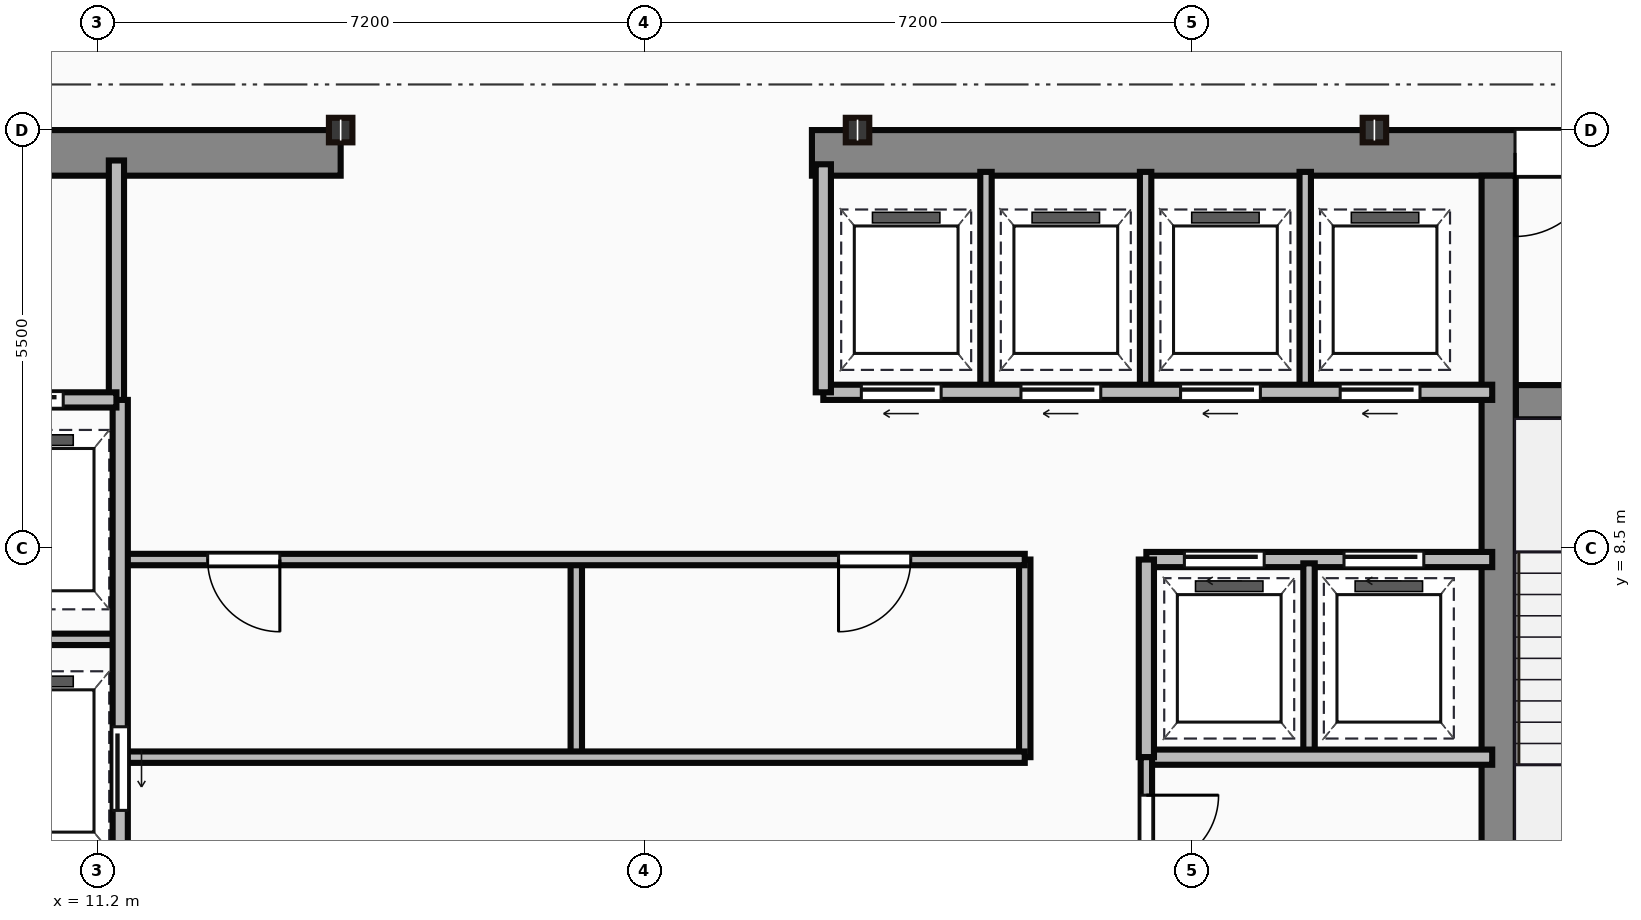
"""IFC4 building model, lengths in metres.
Left out: names, types, materials, properties, quantities, classifications, styles, units other than length and angle.
Written with IfcOpenShell. Run it as: python <this file> out.ifc"""

import sys

from ifc_helpers import new_model, si_unit, direction, frame, frame_2d, origin, origin_2d, place, context, subcontext, project, spatial, rectangle, i_section, extrude, source, transform, mapped, element, fill, save


model = new_model("IFC4")
c1 = context("Model", 3, precision=1e-05, world=origin(), true_north=direction((0.0, 1.0)))
c2 = subcontext(c1, "Body", "Model", "MODEL_VIEW")
j1 = project(units=[si_unit("LENGTHUNIT", "METRE"), si_unit("PLANEANGLEUNIT", "RADIAN")], contexts=[c1])
p1 = place(None, origin())
s1 = spatial("IfcSite", under=j1, at=p1, CompositionType="ELEMENT")
p2 = place(p1, origin())
s2 = spatial("IfcBuilding", under=s1, at=p2, CompositionType="ELEMENT")
p3 = place(p2, frame((0.0, 0.0, 232.4)))
s3 = spatial("IfcBuildingStorey", under=s2, at=p3, CompositionType="ELEMENT", Elevation=232.4)
m1 = source(origin(), c2, "Body", "SweptSolid", [
    extrude(rectangle(XDim=9.1, YDim=0.6, at=frame_2d((4.55, 0.0))), origin(), (0.0, 0.0, 1.0), 3.65),
])
p4 = place(p3, frame((5.3, 13.7, 0.0), z_axis=(0.0, 0.0, 1.0), x_axis=(1.0, 0.0, 0.0)))
e1 = element("IfcWall", 1, at=p4, inside=s3, PredefinedType="SHEAR", context=c2, shape_type="MappedRepresentation", body=[
    mapped(m1, transform((0.0, 0.0, 0.0))),
])
p5 = place(p4, frame((4.1, 0.0, 0.0)))
e2 = element("IfcOpeningElement", 2, at=p5, cuts=e1, PredefinedType="OPENING", context=c2, shape_type="SweptSolid", body=[
    extrude(rectangle(XDim=1.1, YDim=2.15, at=frame_2d((0.55, 1.075))), frame((0.0, 0.31, 0.0), z_axis=(0.0, -1.0, 0.0), x_axis=(1.0, 0.0, 0.0)), (0.0, 0.0, 1.0), 0.62),
])
m2 = source(origin(), c2, "Body", "SweptSolid", [
    extrude(rectangle(XDim=12.6, YDim=0.6, at=frame_2d((6.3, 0.0))), origin(), (0.0, 0.0, 1.0), 3.65),
])
p6 = place(p3, frame((20.6, 13.7, 0.0), z_axis=(0.0, 0.0, 1.0), x_axis=(1.0, 0.0, 0.0)))
e3 = element("IfcWall", 3, at=p6, inside=s3, PredefinedType="SHEAR", context=c2, shape_type="MappedRepresentation", body=[
    mapped(m2, transform((0.0, 0.0, 0.0))),
])
p7 = place(p6, frame((9.25, 0.0, 0.0)))
e4 = element("IfcOpeningElement", 4, at=p7, cuts=e3, PredefinedType="OPENING", context=c2, shape_type="SweptSolid", body=[
    extrude(rectangle(XDim=1.1, YDim=2.15, at=frame_2d((0.55, 1.075))), frame((0.0, 0.31, 0.0), z_axis=(0.0, -1.0, 0.0), x_axis=(1.0, 0.0, 0.0)), (0.0, 0.0, 1.0), 0.62),
])
m3 = source(origin(), c2, "Body", "SweptSolid", [
    extrude(rectangle(XDim=12.5, YDim=0.45, at=frame_2d((6.25, 0.0))), origin(), (0.0, 0.0, 1.0), 3.65),
])
p8 = place(p3, frame((29.635, 0.9, 0.0), z_axis=(0.0, 0.0, 1.0), x_axis=(0.0, 1.0, 0.0)))
e5 = element("IfcWall", 5, at=p8, inside=s3, PredefinedType="SHEAR", context=c2, shape_type="MappedRepresentation", body=[
    mapped(m3, transform((0.0, 0.0, 0.0))),
])
m4 = source(origin(), c2, "Body", "SweptSolid", [
    extrude(rectangle(XDim=3.39, YDim=0.45, at=frame_2d((1.695, 0.0))), origin(), (0.0, 0.0, 1.0), 3.65),
])
p9 = place(p3, frame((29.86, 10.42, 0.0), z_axis=(0.0, 0.0, 1.0), x_axis=(1.0, 0.0, 0.0)))
e6 = element("IfcWall", 6, at=p9, inside=s3, PredefinedType="SHEAR", context=c2, shape_type="MappedRepresentation", body=[
    mapped(m4, transform((0.0, 0.0, 0.0))),
])
p10 = place(p9, frame((1.1, 0.0, 0.0)))
e7 = element("IfcOpeningElement", 7, at=p10, cuts=e6, PredefinedType="OPENING", context=c2, shape_type="SweptSolid", body=[
    extrude(rectangle(XDim=1.1, YDim=2.15, at=frame_2d((0.55, 1.075))), frame((0.0, 0.235, 0.0), z_axis=(0.0, -1.0, 0.0), x_axis=(1.0, 0.0, 0.0)), (0.0, 0.0, 1.0), 0.47),
])
m5 = source(origin(), c2, "Body", "SweptSolid", [
    extrude(i_section(OverallWidth=0.309, OverallDepth=0.323, WebThickness=0.014, FlangeThickness=0.023, at=origin_2d()), origin(), (0.0, 0.0, 1.0), 3.65),
])
for number, where, z_axis, x_axis in (
    (8, (14.4, 14.0, 0.0), (0.0, 0.0, 1.0), (1.0, 0.0, 0.0)),
    (9, (21.2, 14.0, 0.0), (0.0, 0.0, 1.0), (1.0, 0.0, 0.0)),
    (10, (28.0, 14.0, 0.0), (0.0, 0.0, 1.0), (1.0, 0.0, 0.0)),
):
    element("IfcColumn", number, at=place(p3, frame(where, z_axis=z_axis, x_axis=x_axis)), inside=s3, PredefinedType="COLUMN", context=c2, shape_type="MappedRepresentation", body=[
        mapped(m5, transform((0.0, 0.0, 0.0))),
    ])
m6 = source(origin(), c2, "Body", "SweptSolid", [
    extrude(rectangle(XDim=3.18, YDim=0.2, at=frame_2d((1.59, 0.0))), origin(), (0.0, 0.0, 1.0), 3.35),
])
p11 = place(p3, frame((11.45, 10.42, 0.0), z_axis=(0.0, 0.0, 1.0), x_axis=(0.0, 1.0, 0.0)))
e11 = element("IfcWall", 11, at=p11, inside=s3, PredefinedType="PARTITIONING", context=c2, shape_type="MappedRepresentation", body=[
    mapped(m6, transform((0.0, 0.0, 0.0))),
])
m7 = source(origin(), c2, "Body", "SweptSolid", [
    extrude(rectangle(XDim=2.35, YDim=0.2, at=frame_2d((1.175, 0.0))), origin(), (0.0, 0.0, 1.0), 3.35),
])
p12 = place(p3, frame((9.1, 10.45, 0.0), z_axis=(0.0, 0.0, 1.0), x_axis=(1.0, 0.0, 0.0)))
e12 = element("IfcWall", 12, at=p12, inside=s3, PredefinedType="PARTITIONING", context=c2, shape_type="MappedRepresentation", body=[
    mapped(m7, transform((0.0, 0.0, 0.0))),
])
p13 = place(p12, frame((0.55, 0.0, 0.0)))
e13 = element("IfcOpeningElement", 13, at=p13, cuts=e12, PredefinedType="OPENING", context=c2, shape_type="SweptSolid", body=[
    extrude(rectangle(XDim=1.1, YDim=2.15, at=frame_2d((0.55, 1.075))), frame((0.0, 0.11, 0.0), z_axis=(0.0, -1.0, 0.0), x_axis=(1.0, 0.0, 0.0)), (0.0, 0.0, 1.0), 0.22),
])
m8 = source(origin(), c2, "Body", "SweptSolid", [
    extrude(rectangle(XDim=9.6, YDim=0.2, at=frame_2d((4.8, 0.0))), origin(), (0.0, 0.0, 1.0), 3.35),
])
p14 = place(p3, frame((11.5, 0.85, 0.0), z_axis=(0.0, 0.0, 1.0), x_axis=(0.0, 1.0, 0.0)))
e14 = element("IfcWall", 14, at=p14, inside=s3, PredefinedType="PARTITIONING", context=c2, shape_type="MappedRepresentation", body=[
    mapped(m8, transform((0.0, 0.0, 0.0))),
])
p15 = place(p14, frame((4.2, 0.0, 0.0)))
e15 = element("IfcOpeningElement", 15, at=p15, cuts=e14, PredefinedType="OPENING", context=c2, shape_type="SweptSolid", body=[
    extrude(rectangle(XDim=1.1, YDim=2.15, at=frame_2d((0.55, 1.075))), frame((0.0, 0.11, 0.0), z_axis=(0.0, -1.0, 0.0), x_axis=(1.0, 0.0, 0.0)), (0.0, 0.0, 1.0), 0.22),
])
p16 = place(p14, frame((0.9, 0.0, 0.0)))
e16 = element("IfcOpeningElement", 16, at=p16, cuts=e14, PredefinedType="OPENING", context=c2, shape_type="SweptSolid", body=[
    extrude(rectangle(XDim=1.2, YDim=2.15, at=frame_2d((0.6, 1.075))), frame((0.0, 0.11, 0.0), z_axis=(0.0, -1.0, 0.0), x_axis=(1.0, 0.0, 0.0)), (0.0, 0.0, 1.0), 0.22),
])
m9 = source(origin(), c2, "Body", "SweptSolid", [
    extrude(rectangle(XDim=2.4, YDim=0.15, at=frame_2d((1.2, 0.0))), origin(), (0.0, 0.0, 1.0), 3.35),
])
p17 = place(p3, frame((9.1, 7.3, 0.0), z_axis=(0.0, 0.0, 1.0), x_axis=(1.0, 0.0, 0.0)))
e17 = element("IfcWall", 17, at=p17, inside=s3, PredefinedType="PARTITIONING", context=c2, shape_type="MappedRepresentation", body=[
    mapped(m9, transform((0.0, 0.0, 0.0))),
])
m10 = source(origin(), c2, "Body", "SweptSolid", [
    extrude(rectangle(XDim=11.85, YDim=0.15, at=frame_2d((5.925, 0.0))), origin(), (0.0, 0.0, 1.0), 3.35),
])
p18 = place(p3, frame((11.55, 5.75, 0.0), z_axis=(0.0, 0.0, 1.0), x_axis=(1.0, 0.0, 0.0)))
e18 = element("IfcWall", 18, at=p18, inside=s3, PredefinedType="PARTITIONING", context=c2, shape_type="MappedRepresentation", body=[
    mapped(m10, transform((0.0, 0.0, 0.0))),
])
p19 = place(p3, frame((11.55, 8.35, 0.0), z_axis=(0.0, 0.0, 1.0), x_axis=(1.0, 0.0, 0.0)))
e19 = element("IfcWall", 19, at=p19, inside=s3, PredefinedType="PARTITIONING", context=c2, shape_type="MappedRepresentation", body=[
    mapped(m10, transform((0.0, 0.0, 0.0))),
])
p20 = place(p19, frame((1.1, 0.0, 0.0)))
e20 = element("IfcOpeningElement", 20, at=p20, cuts=e19, PredefinedType="OPENING", context=c2, shape_type="SweptSolid", body=[
    extrude(rectangle(XDim=0.95, YDim=2.15, at=frame_2d((0.475, 1.075))), frame((0.0, 0.085, 0.0), z_axis=(0.0, -1.0, 0.0), x_axis=(1.0, 0.0, 0.0)), (0.0, 0.0, 1.0), 0.17),
])
p21 = place(p19, frame((9.4, 0.0, 0.0)))
e21 = element("IfcOpeningElement", 21, at=p21, cuts=e19, PredefinedType="OPENING", context=c2, shape_type="SweptSolid", body=[
    extrude(rectangle(XDim=0.95, YDim=2.15, at=frame_2d((0.475, 1.075))), frame((0.0, 0.085, 0.0), z_axis=(0.0, -1.0, 0.0), x_axis=(1.0, 0.0, 0.0)), (0.0, 0.0, 1.0), 0.17),
])
m11 = source(origin(), c2, "Body", "SweptSolid", [
    extrude(rectangle(XDim=2.6, YDim=0.15, at=frame_2d((1.3, 0.0))), origin(), (0.0, 0.0, 1.0), 3.35),
])
p22 = place(p3, frame((23.4, 5.75, 0.0), z_axis=(0.0, 0.0, 1.0), x_axis=(0.0, 1.0, 0.0)))
e22 = element("IfcWall", 22, at=p22, inside=s3, PredefinedType="PARTITIONING", context=c2, shape_type="MappedRepresentation", body=[
    mapped(m11, transform((0.0, 0.0, 0.0))),
])
m12 = source(origin(), c2, "Body", "SweptSolid", [
    extrude(rectangle(XDim=2.5, YDim=0.15, at=frame_2d((1.25, 0.0))), origin(), (0.0, 0.0, 1.0), 3.35),
])
p23 = place(p3, frame((17.5, 5.8, 0.0), z_axis=(0.0, 0.0, 1.0), x_axis=(0.0, 1.0, 0.0)))
e23 = element("IfcWall", 23, at=p23, inside=s3, PredefinedType="PARTITIONING", context=c2, shape_type="MappedRepresentation", body=[
    mapped(m12, transform((0.0, 0.0, 0.0))),
])
m13 = source(origin(), c2, "Body", "SweptSolid", [
    extrude(rectangle(XDim=8.8, YDim=0.2, at=frame_2d((4.4, 0.0))), origin(), (0.0, 0.0, 1.0), 3.35),
])
p24 = place(p3, frame((20.75, 10.55, 0.0), z_axis=(0.0, 0.0, 1.0), x_axis=(1.0, 0.0, 0.0)))
e24 = element("IfcWall", 24, at=p24, inside=s3, PredefinedType="PARTITIONING", context=c2, shape_type="MappedRepresentation", body=[
    mapped(m13, transform((0.0, 0.0, 0.0))),
])
p25 = place(p24, frame((0.5, 0.0, 0.0)))
e25 = element("IfcOpeningElement", 25, at=p25, cuts=e24, PredefinedType="OPENING", context=c2, shape_type="SweptSolid", body=[
    extrude(rectangle(XDim=1.05, YDim=2.15, at=frame_2d((0.525, 1.075))), frame((0.0, 0.11, 0.0), z_axis=(0.0, -1.0, 0.0), x_axis=(1.0, 0.0, 0.0)), (0.0, 0.0, 1.0), 0.22),
])
p26 = place(p24, frame((2.6, 0.0, 0.0)))
e26 = element("IfcOpeningElement", 26, at=p26, cuts=e24, PredefinedType="OPENING", context=c2, shape_type="SweptSolid", body=[
    extrude(rectangle(XDim=1.05, YDim=2.15, at=frame_2d((0.525, 1.075))), frame((0.0, 0.11, 0.0), z_axis=(0.0, -1.0, 0.0), x_axis=(1.0, 0.0, 0.0)), (0.0, 0.0, 1.0), 0.22),
])
p27 = place(p24, frame((4.7, 0.0, 0.0)))
e27 = element("IfcOpeningElement", 27, at=p27, cuts=e24, PredefinedType="OPENING", context=c2, shape_type="SweptSolid", body=[
    extrude(rectangle(XDim=1.05, YDim=2.15, at=frame_2d((0.525, 1.075))), frame((0.0, 0.11, 0.0), z_axis=(0.0, -1.0, 0.0), x_axis=(1.0, 0.0, 0.0)), (0.0, 0.0, 1.0), 0.22),
])
p28 = place(p24, frame((6.8, 0.0, 0.0)))
e28 = element("IfcOpeningElement", 28, at=p28, cuts=e24, PredefinedType="OPENING", context=c2, shape_type="SweptSolid", body=[
    extrude(rectangle(XDim=1.05, YDim=2.15, at=frame_2d((0.525, 1.075))), frame((0.0, 0.11, 0.0), z_axis=(0.0, -1.0, 0.0), x_axis=(1.0, 0.0, 0.0)), (0.0, 0.0, 1.0), 0.22),
])
m14 = source(origin(), c2, "Body", "SweptSolid", [
    extrude(rectangle(XDim=3.0, YDim=0.2, at=frame_2d((1.5, 0.0))), origin(), (0.0, 0.0, 1.0), 3.35),
])
p29 = place(p3, frame((20.75, 10.55, 0.0), z_axis=(0.0, 0.0, 1.0), x_axis=(0.0, 1.0, 0.0)))
e29 = element("IfcWall", 29, at=p29, inside=s3, PredefinedType="PARTITIONING", context=c2, shape_type="MappedRepresentation", body=[
    mapped(m14, transform((0.0, 0.0, 0.0))),
])
m15 = source(origin(), c2, "Body", "SweptSolid", [
    extrude(rectangle(XDim=2.85, YDim=0.15, at=frame_2d((1.425, 0.0))), origin(), (0.0, 0.0, 1.0), 3.35),
])
for number, where, z_axis, x_axis in (
    (30, (22.89, 10.6, 0.0), (0.0, 0.0, 1.0), (0.0, 1.0, 0.0)),
    (31, (24.99, 10.6, 0.0), (0.0, 0.0, 1.0), (0.0, 1.0, 0.0)),
    (32, (27.09, 10.6, 0.0), (0.0, 0.0, 1.0), (0.0, 1.0, 0.0)),
):
    element("IfcWall", number, at=place(p3, frame(where, z_axis=z_axis, x_axis=x_axis)), inside=s3, PredefinedType="PARTITIONING", context=c2, shape_type="MappedRepresentation", body=[
        mapped(m15, transform((0.0, 0.0, 0.0))),
    ])
m16 = source(origin(), c2, "Body", "SweptSolid", [
    extrude(rectangle(XDim=4.55, YDim=0.2, at=frame_2d((2.275, 0.0))), origin(), (0.0, 0.0, 1.0), 3.35),
])
p30 = place(p3, frame((25.0, 8.35, 0.0), z_axis=(0.0, 0.0, 1.0), x_axis=(1.0, 0.0, 0.0)))
e33 = element("IfcWall", 33, at=p30, inside=s3, PredefinedType="PARTITIONING", context=c2, shape_type="MappedRepresentation", body=[
    mapped(m16, transform((0.0, 0.0, 0.0))),
])
p31 = place(p30, frame((0.5, 0.0, 0.0)))
e34 = element("IfcOpeningElement", 34, at=p31, cuts=e33, PredefinedType="OPENING", context=c2, shape_type="SweptSolid", body=[
    extrude(rectangle(XDim=1.05, YDim=2.15, at=frame_2d((0.525, 1.075))), frame((0.0, 0.11, 0.0), z_axis=(0.0, -1.0, 0.0), x_axis=(1.0, 0.0, 0.0)), (0.0, 0.0, 1.0), 0.22),
])
p32 = place(p30, frame((2.6, 0.0, 0.0)))
e35 = element("IfcOpeningElement", 35, at=p32, cuts=e33, PredefinedType="OPENING", context=c2, shape_type="SweptSolid", body=[
    extrude(rectangle(XDim=1.05, YDim=2.15, at=frame_2d((0.525, 1.075))), frame((0.0, 0.11, 0.0), z_axis=(0.0, -1.0, 0.0), x_axis=(1.0, 0.0, 0.0)), (0.0, 0.0, 1.0), 0.22),
])
p33 = place(p3, frame((25.0, 5.75, 0.0), z_axis=(0.0, 0.0, 1.0), x_axis=(1.0, 0.0, 0.0)))
e36 = element("IfcWall", 36, at=p33, inside=s3, PredefinedType="PARTITIONING", context=c2, shape_type="MappedRepresentation", body=[
    mapped(m16, transform((0.0, 0.0, 0.0))),
])
m17 = source(origin(), c2, "Body", "SweptSolid", [
    extrude(rectangle(XDim=2.6, YDim=0.2, at=frame_2d((1.3, 0.0))), origin(), (0.0, 0.0, 1.0), 3.35),
])
p34 = place(p3, frame((25.0, 5.75, 0.0), z_axis=(0.0, 0.0, 1.0), x_axis=(0.0, 1.0, 0.0)))
e37 = element("IfcWall", 37, at=p34, inside=s3, PredefinedType="PARTITIONING", context=c2, shape_type="MappedRepresentation", body=[
    mapped(m17, transform((0.0, 0.0, 0.0))),
])
p35 = place(p3, frame((27.14, 5.8, 0.0), z_axis=(0.0, 0.0, 1.0), x_axis=(0.0, 1.0, 0.0)))
e38 = element("IfcWall", 38, at=p35, inside=s3, PredefinedType="PARTITIONING", context=c2, shape_type="MappedRepresentation", body=[
    mapped(m12, transform((0.0, 0.0, 0.0))),
])
m18 = source(origin(), c2, "Body", "SweptSolid", [
    extrude(rectangle(XDim=4.9, YDim=0.15, at=frame_2d((2.45, 0.0))), origin(), (0.0, 0.0, 1.0), 3.35),
])
p36 = place(p3, frame((25.0, 0.85, 0.0), z_axis=(0.0, 0.0, 1.0), x_axis=(0.0, 1.0, 0.0)))
e39 = element("IfcWall", 39, at=p36, inside=s3, PredefinedType="PARTITIONING", context=c2, shape_type="MappedRepresentation", body=[
    mapped(m18, transform((0.0, 0.0, 0.0))),
])
p37 = place(p36, frame((1.8, 0.0, 0.0)))
e40 = element("IfcOpeningElement", 40, at=p37, cuts=e39, PredefinedType="OPENING", context=c2, shape_type="SweptSolid", body=[
    extrude(rectangle(XDim=0.95, YDim=2.15, at=frame_2d((0.475, 1.075))), frame((0.0, 0.085, 0.0), z_axis=(0.0, -1.0, 0.0), x_axis=(1.0, 0.0, 0.0)), (0.0, 0.0, 1.0), 0.17),
])
p38 = place(p36, frame((3.45, 0.0, 0.0)))
e41 = element("IfcOpeningElement", 41, at=p38, cuts=e39, PredefinedType="OPENING", context=c2, shape_type="SweptSolid", body=[
    extrude(rectangle(XDim=0.95, YDim=2.15, at=frame_2d((0.475, 1.075))), frame((0.0, 0.085, 0.0), z_axis=(0.0, -1.0, 0.0), x_axis=(1.0, 0.0, 0.0)), (0.0, 0.0, 1.0), 0.17),
])
m19 = source(origin(), c2, "Body", "SweptSolid", [
    extrude(rectangle(XDim=1.1, YDim=2.15, at=frame_2d((0.55, 1.075))), frame((0.0, 0.025, 0.0), z_axis=(0.0, -1.0, 0.0), x_axis=(1.0, 0.0, 0.0)), (0.0, 0.0, 1.0), 0.05),
])
p39 = place(p7, origin())
e42 = element("IfcDoor", 42, at=p39, inside=s3, OperationType="SINGLE_SWING_LEFT", PredefinedType="DOOR", context=c2, shape_type="MappedRepresentation", body=[
    mapped(m19, transform((0.0, 0.0, 0.0))),
])
fill(e4, e42)
p40 = place(p13, origin())
e43 = element("IfcDoor", 43, at=p40, inside=s3, OperationType="SLIDING_TO_LEFT", PredefinedType="DOOR", context=c2, shape_type="MappedRepresentation", body=[
    mapped(m19, transform((0.0, 0.0, 0.0))),
])
fill(e13, e43)
p41 = place(p15, frame((1.1, 0.0, 0.0), z_axis=(0.0, 0.0, 1.0), x_axis=(-1.0, 0.0, 0.0)))
e44 = element("IfcDoor", 44, at=p41, inside=s3, OperationType="SLIDING_TO_LEFT", PredefinedType="DOOR", context=c2, shape_type="MappedRepresentation", body=[
    mapped(m19, transform((0.0, 0.0, 0.0))),
])
fill(e15, e44)
m20 = source(origin(), c2, "Body", "SweptSolid", [
    extrude(rectangle(XDim=0.95, YDim=2.15, at=frame_2d((0.475, 1.075))), frame((0.0, 0.025, 0.0), z_axis=(0.0, -1.0, 0.0), x_axis=(1.0, 0.0, 0.0)), (0.0, 0.0, 1.0), 0.05),
])
p42 = place(p20, origin())
e45 = element("IfcDoor", 45, at=p42, inside=s3, OperationType="SINGLE_SWING_RIGHT", PredefinedType="DOOR", context=c2, shape_type="MappedRepresentation", body=[
    mapped(m20, transform((0.0, 0.0, 0.0))),
])
fill(e20, e45)
p43 = place(p21, origin())
e46 = element("IfcDoor", 46, at=p43, inside=s3, OperationType="SINGLE_SWING_LEFT", PredefinedType="DOOR", context=c2, shape_type="MappedRepresentation", body=[
    mapped(m20, transform((0.0, 0.0, 0.0))),
])
fill(e21, e46)
m21 = source(origin(), c2, "Body", "SweptSolid", [
    extrude(rectangle(XDim=1.05, YDim=2.15, at=frame_2d((0.525, 1.075))), frame((0.0, 0.025, 0.0), z_axis=(0.0, -1.0, 0.0), x_axis=(1.0, 0.0, 0.0)), (0.0, 0.0, 1.0), 0.05),
])
p44 = place(p25, frame((1.05, 0.0, 0.0), z_axis=(0.0, 0.0, 1.0), x_axis=(-1.0, 0.0, 0.0)))
e47 = element("IfcDoor", 47, at=p44, inside=s3, OperationType="SLIDING_TO_LEFT", PredefinedType="DOOR", context=c2, shape_type="MappedRepresentation", body=[
    mapped(m21, transform((0.0, 0.0, 0.0))),
])
fill(e25, e47)
p45 = place(p26, frame((1.05, 0.0, 0.0), z_axis=(0.0, 0.0, 1.0), x_axis=(-1.0, 0.0, 0.0)))
e48 = element("IfcDoor", 48, at=p45, inside=s3, OperationType="SLIDING_TO_LEFT", PredefinedType="DOOR", context=c2, shape_type="MappedRepresentation", body=[
    mapped(m21, transform((0.0, 0.0, 0.0))),
])
fill(e26, e48)
p46 = place(p27, frame((1.05, 0.0, 0.0), z_axis=(0.0, 0.0, 1.0), x_axis=(-1.0, 0.0, 0.0)))
e49 = element("IfcDoor", 49, at=p46, inside=s3, OperationType="SLIDING_TO_LEFT", PredefinedType="DOOR", context=c2, shape_type="MappedRepresentation", body=[
    mapped(m21, transform((0.0, 0.0, 0.0))),
])
fill(e27, e49)
p47 = place(p28, frame((1.05, 0.0, 0.0), z_axis=(0.0, 0.0, 1.0), x_axis=(-1.0, 0.0, 0.0)))
e50 = element("IfcDoor", 50, at=p47, inside=s3, OperationType="SLIDING_TO_LEFT", PredefinedType="DOOR", context=c2, shape_type="MappedRepresentation", body=[
    mapped(m21, transform((0.0, 0.0, 0.0))),
])
fill(e28, e50)
p48 = place(p31, origin())
e51 = element("IfcDoor", 51, at=p48, inside=s3, OperationType="SLIDING_TO_LEFT", PredefinedType="DOOR", context=c2, shape_type="MappedRepresentation", body=[
    mapped(m21, transform((0.0, 0.0, 0.0))),
])
fill(e34, e51)
p49 = place(p32, origin())
e52 = element("IfcDoor", 52, at=p49, inside=s3, OperationType="SLIDING_TO_LEFT", PredefinedType="DOOR", context=c2, shape_type="MappedRepresentation", body=[
    mapped(m21, transform((0.0, 0.0, 0.0))),
])
fill(e35, e52)
p50 = place(p38, origin())
e53 = element("IfcDoor", 53, at=p50, inside=s3, OperationType="SINGLE_SWING_RIGHT", PredefinedType="DOOR", context=c2, shape_type="MappedRepresentation", body=[
    mapped(m20, transform((0.0, 0.0, 0.0))),
])
fill(e41, e53)
save(model, sys.argv[1])
